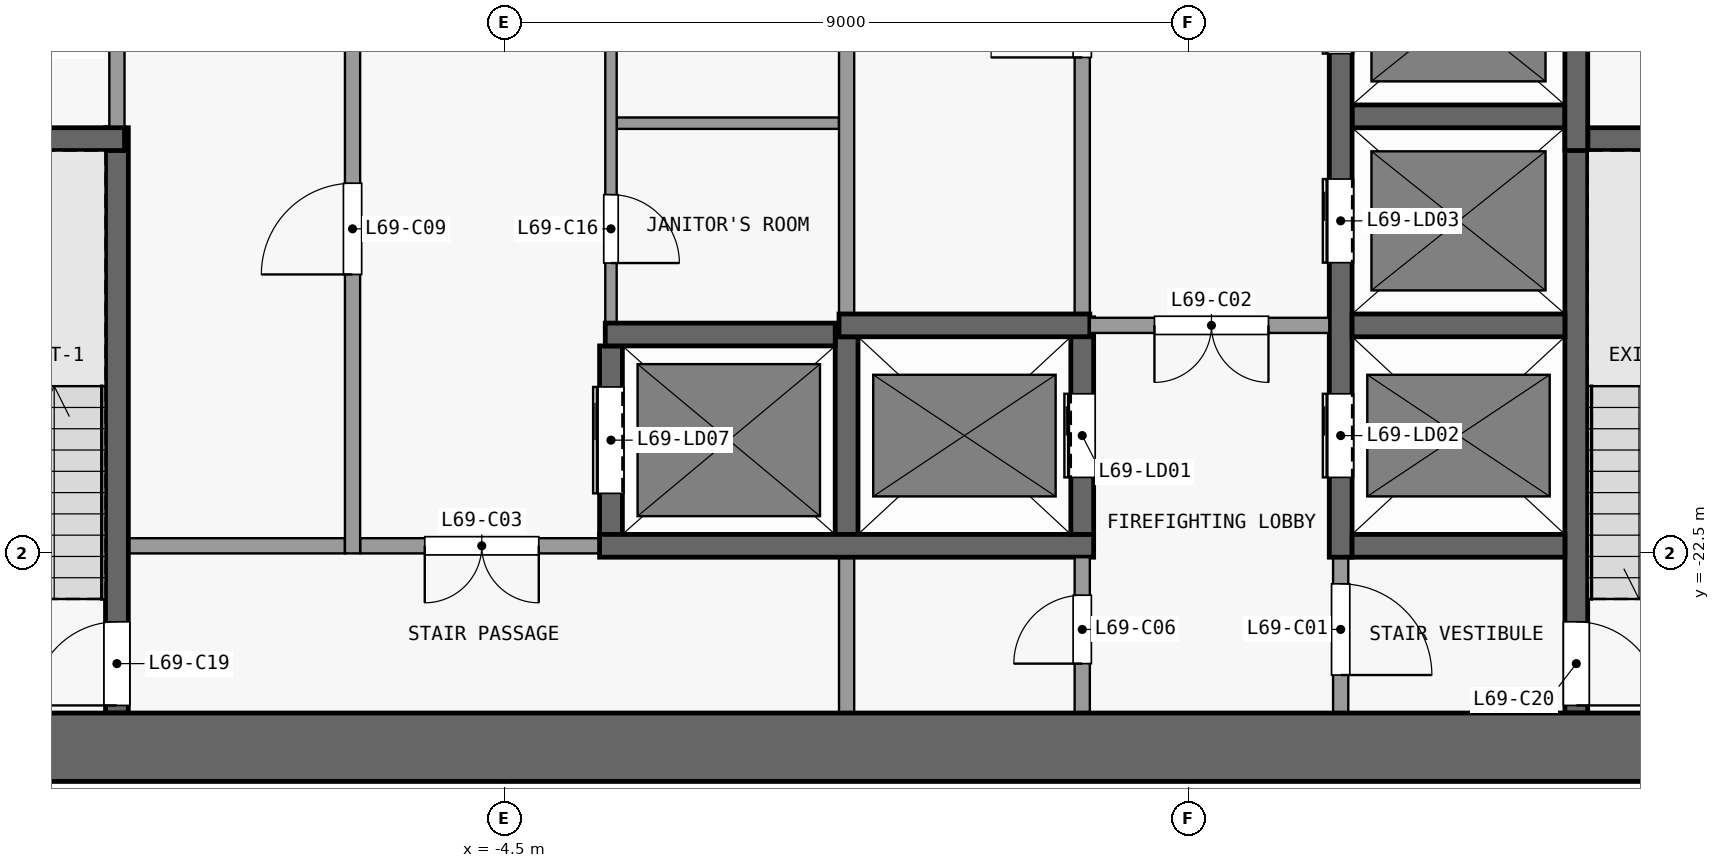
"""IFC4 building model, lengths in metres.
Left out: names, types, materials, properties, quantities, classifications, styles, units other than length and angle.
Written with IfcOpenShell. Run it as: python <this file> out.ifc"""

import sys

from ifc_helpers import new_model, si_unit, direction, frame, frame_2d, origin, place, context, subcontext, project, spatial, rectangle, extrude, element, fill, save


model = new_model("IFC4")
c1 = context("Model", 3, precision=1e-05, world=origin(), true_north=direction((0.0, 1.0)))
c2 = subcontext(c1, "Body", "Model", "MODEL_VIEW")
j1 = project(units=[si_unit("LENGTHUNIT", "METRE"), si_unit("PLANEANGLEUNIT", "RADIAN")], contexts=[c1])
p1 = place(None, origin())
s1 = spatial("IfcSite", under=j1, at=p1, CompositionType="ELEMENT")
p2 = place(p1, origin())
s2 = spatial("IfcBuilding", under=s1, at=p2, CompositionType="ELEMENT")
p3 = place(p2, frame((0.0, 0.0, 273.5)))
s3 = spatial("IfcBuildingStorey", under=s2, at=p3, CompositionType="ELEMENT", Elevation=273.5)
p4 = place(p3, frame((-13.1, -25.05, 0.0), z_axis=(0.0, 0.0, 1.0), x_axis=(1.0, 0.0, 0.0)))
e1 = element("IfcWall", 1, at=p4, inside=s3, PredefinedType="SHEAR", context=c2, shape_type="SweptSolid", body=[
    extrude(rectangle(XDim=26.2, YDim=0.9, at=frame_2d((13.1, 0.0))), origin(), (0.0, 0.0, 1.0), 3.3),
])
p5 = place(p3, frame((-9.45, -22.4, 0.0), z_axis=(0.0, 0.0, 1.0), x_axis=(1.0, 0.0, 0.0)))
e2 = element("IfcWall", 2, at=p5, inside=s3, PredefinedType="PARTITIONING", context=c2, shape_type="SweptSolid", body=[
    extrude(rectangle(XDim=2.85, YDim=0.2, at=frame_2d((1.425, 0.0))), origin(), (0.0, 0.0, 1.0), 3.3),
])
p6 = place(p3, frame((-3.25, -22.4, 0.0), z_axis=(0.0, 0.0, 1.0), x_axis=(-1.0, 0.0, 0.0)))
e3 = element("IfcWall", 3, at=p6, inside=s3, PredefinedType="PARTITIONING", context=c2, shape_type="SweptSolid", body=[
    extrude(rectangle(XDim=3.15, YDim=0.2, at=frame_2d((1.575, 0.0))), origin(), (0.0, 0.0, 1.0), 3.3),
])
p7 = place(p6, frame((0.8, 0.0, 0.0)))
e4 = element("IfcOpeningElement", 4, at=p7, cuts=e3, PredefinedType="OPENING", context=c2, shape_type="SweptSolid", body=[
    extrude(rectangle(XDim=1.5, YDim=2.1, at=frame_2d((0.75, 1.05))), frame((0.0, 0.11, 0.0), z_axis=(0.0, -1.0, 0.0), x_axis=(1.0, 0.0, 0.0)), (0.0, 0.0, 1.0), 0.22),
])
p8 = place(p3, frame((-3.25, -22.4, 0.0), z_axis=(0.0, 0.0, 1.0), x_axis=(1.0, 0.0, 0.0)))
e5 = element("IfcWall", 5, at=p8, inside=s3, PredefinedType="SHEAR", context=c2, shape_type="SweptSolid", body=[
    extrude(rectangle(XDim=6.5, YDim=0.3, at=frame_2d((3.25, 0.0))), origin(), (0.0, 0.0, 1.0), 3.3),
])
p9 = place(p3, frame((6.65, -22.4, 0.0), z_axis=(0.0, 0.0, 1.0), x_axis=(1.0, 0.0, 0.0)))
e6 = element("IfcWall", 6, at=p9, inside=s3, PredefinedType="SHEAR", context=c2, shape_type="SweptSolid", body=[
    extrude(rectangle(XDim=2.8, YDim=0.3, at=frame_2d((1.4, 0.0))), origin(), (0.0, 0.0, 1.0), 3.3),
])
p10 = place(p3, frame((-3.175, -19.62, 0.0), z_axis=(0.0, 0.0, 1.0), x_axis=(1.0, 0.0, 0.0)))
e7 = element("IfcWall", 7, at=p10, inside=s3, PredefinedType="SHEAR", context=c2, shape_type="SweptSolid", body=[
    extrude(rectangle(XDim=3.025, YDim=0.3, at=frame_2d((1.513, 0.0))), origin(), (0.0, 0.0, 1.0), 3.3),
])
p11 = place(p3, frame((-0.1, -19.5, 0.0), z_axis=(0.0, 0.0, 1.0), x_axis=(1.0, 0.0, 0.0)))
e8 = element("IfcWall", 8, at=p11, inside=s3, PredefinedType="SHEAR", context=c2, shape_type="SweptSolid", body=[
    extrude(rectangle(XDim=3.3, YDim=0.3, at=frame_2d((1.65, 0.0))), origin(), (0.0, 0.0, 1.0), 3.3),
])
p12 = place(p3, frame((6.35, -19.5, 0.0), z_axis=(0.0, 0.0, 1.0), x_axis=(-1.0, 0.0, 0.0)))
e9 = element("IfcWall", 9, at=p12, inside=s3, PredefinedType="PARTITIONING", context=c2, shape_type="SweptSolid", body=[
    extrude(rectangle(XDim=3.15, YDim=0.2, at=frame_2d((1.575, 0.0))), origin(), (0.0, 0.0, 1.0), 3.3),
])
p13 = place(p12, frame((0.8, 0.0, 0.0)))
e10 = element("IfcOpeningElement", 10, at=p13, cuts=e9, PredefinedType="OPENING", context=c2, shape_type="SweptSolid", body=[
    extrude(rectangle(XDim=1.5, YDim=2.1, at=frame_2d((0.75, 1.05))), frame((0.0, 0.11, 0.0), z_axis=(0.0, -1.0, 0.0), x_axis=(1.0, 0.0, 0.0)), (0.0, 0.0, 1.0), 0.22),
])
p14 = place(p3, frame((6.65, -19.5, 0.0), z_axis=(0.0, 0.0, 1.0), x_axis=(1.0, 0.0, 0.0)))
e11 = element("IfcWall", 11, at=p14, inside=s3, PredefinedType="SHEAR", context=c2, shape_type="SweptSolid", body=[
    extrude(rectangle(XDim=2.8, YDim=0.3, at=frame_2d((1.4, 0.0))), origin(), (0.0, 0.0, 1.0), 3.3),
])
p15 = place(p3, frame((-12.6, -17.05, 0.0), z_axis=(0.0, 0.0, 1.0), x_axis=(1.0, 0.0, 0.0)))
e12 = element("IfcWall", 12, at=p15, inside=s3, PredefinedType="SHEAR", context=c2, shape_type="SweptSolid", body=[
    extrude(rectangle(XDim=3.1, YDim=0.3, at=frame_2d((1.55, 0.0))), origin(), (0.0, 0.0, 1.0), 3.3),
])
p16 = place(p3, frame((9.75, -17.05, 0.0), z_axis=(0.0, 0.0, 1.0), x_axis=(1.0, 0.0, 0.0)))
e13 = element("IfcWall", 13, at=p16, inside=s3, PredefinedType="SHEAR", context=c2, shape_type="SweptSolid", body=[
    extrude(rectangle(XDim=2.85, YDim=0.3, at=frame_2d((1.425, 0.0))), origin(), (0.0, 0.0, 1.0), 3.3),
])
p17 = place(p3, frame((-3.025, -16.84, 0.0), z_axis=(0.0, 0.0, 1.0), x_axis=(1.0, 0.0, 0.0)))
e14 = element("IfcWall", 14, at=p17, inside=s3, PredefinedType="PARTITIONING", context=c2, shape_type="SweptSolid", body=[
    extrude(rectangle(XDim=2.925, YDim=0.15, at=frame_2d((1.462, 0.0))), origin(), (0.0, 0.0, 1.0), 3.3),
])
p18 = place(p3, frame((6.65, -16.75, 0.0), z_axis=(0.0, 0.0, 1.0), x_axis=(1.0, 0.0, 0.0)))
e15 = element("IfcWall", 15, at=p18, inside=s3, PredefinedType="SHEAR", context=c2, shape_type="SweptSolid", body=[
    extrude(rectangle(XDim=2.8, YDim=0.3, at=frame_2d((1.4, 0.0))), origin(), (0.0, 0.0, 1.0), 3.3),
])
p19 = place(p3, frame((-9.6, -24.6, 0.0), z_axis=(0.0, 0.0, 1.0), x_axis=(0.0, 1.0, 0.0)))
e16 = element("IfcWall", 16, at=p19, inside=s3, PredefinedType="SHEAR", context=c2, shape_type="SweptSolid", body=[
    extrude(rectangle(XDim=7.7, YDim=0.3, at=frame_2d((3.85, 0.0))), origin(), (0.0, 0.0, 1.0), 3.3),
])
p20 = place(p19, frame((0.1, 0.0, 0.0)))
e17 = element("IfcOpeningElement", 17, at=p20, cuts=e16, PredefinedType="OPENING", context=c2, shape_type="SweptSolid", body=[
    extrude(rectangle(XDim=1.1, YDim=2.1, at=frame_2d((0.55, 1.05))), frame((0.0, 0.16, 0.0), z_axis=(0.0, -1.0, 0.0), x_axis=(1.0, 0.0, 0.0)), (0.0, 0.0, 1.0), 0.32),
])
p21 = place(p3, frame((-9.6, -16.9, 0.0), z_axis=(0.0, 0.0, 1.0), x_axis=(0.0, 1.0, 0.0)))
e18 = element("IfcWall", 18, at=p21, inside=s3, PredefinedType="PARTITIONING", context=c2, shape_type="SweptSolid", body=[
    extrude(rectangle(XDim=2.74, YDim=0.2, at=frame_2d((1.37, 0.0))), origin(), (0.0, 0.0, 1.0), 3.3),
])
p22 = place(p3, frame((-6.5, -22.5, 0.0), z_axis=(0.0, 0.0, 1.0), x_axis=(0.0, 1.0, 0.0)))
e19 = element("IfcWall", 19, at=p22, inside=s3, PredefinedType="PARTITIONING", context=c2, shape_type="SweptSolid", body=[
    extrude(rectangle(XDim=8.54, YDim=0.2, at=frame_2d((4.27, 0.0))), origin(), (0.0, 0.0, 1.0), 3.3),
])
p23 = place(p22, frame((3.67, 0.0, 0.0)))
e20 = element("IfcOpeningElement", 20, at=p23, cuts=e19, PredefinedType="OPENING", context=c2, shape_type="SweptSolid", body=[
    extrude(rectangle(XDim=1.2, YDim=2.1, at=frame_2d((0.6, 1.05))), frame((0.0, 0.11, 0.0), z_axis=(0.0, -1.0, 0.0), x_axis=(1.0, 0.0, 0.0)), (0.0, 0.0, 1.0), 0.22),
])
p24 = place(p3, frame((-3.1, -22.25, 0.0), z_axis=(0.0, 0.0, 1.0), x_axis=(0.0, 1.0, 0.0)))
e21 = element("IfcWall", 21, at=p24, inside=s3, PredefinedType="SHEAR", context=c2, shape_type="SweptSolid", body=[
    extrude(rectangle(XDim=2.48, YDim=0.3, at=frame_2d((1.24, 0.0))), origin(), (0.0, 0.0, 1.0), 3.3),
])
p25 = place(p24, frame((0.54, 0.0, 0.0)))
e22 = element("IfcOpeningElement", 22, at=p25, cuts=e21, PredefinedType="OPENING", context=c2, shape_type="SweptSolid", body=[
    extrude(rectangle(XDim=1.4, YDim=2.1, at=frame_2d((0.7, 1.05))), frame((0.0, 0.16, 0.0), z_axis=(0.0, -1.0, 0.0), x_axis=(1.0, 0.0, 0.0)), (0.0, 0.0, 1.0), 0.32),
])
p26 = place(p3, frame((-3.1, -8.5, 0.0), z_axis=(0.0, 0.0, 1.0), x_axis=(0.0, -1.0, 0.0)))
e23 = element("IfcWall", 23, at=p26, inside=s3, PredefinedType="PARTITIONING", context=c2, shape_type="SweptSolid", body=[
    extrude(rectangle(XDim=10.97, YDim=0.15, at=frame_2d((5.485, 0.0))), origin(), (0.0, 0.0, 1.0), 3.3),
])
p27 = place(p26, frame((9.28, 0.0, 0.0)))
e24 = element("IfcOpeningElement", 24, at=p27, cuts=e23, PredefinedType="OPENING", context=c2, shape_type="SweptSolid", body=[
    extrude(rectangle(XDim=0.9, YDim=2.1, at=frame_2d((0.45, 1.05))), frame((0.0, 0.085, 0.0), z_axis=(0.0, -1.0, 0.0), x_axis=(1.0, 0.0, 0.0)), (0.0, 0.0, 1.0), 0.17),
])
p28 = place(p26, frame((3.57, 0.0, 0.0)))
e25 = element("IfcOpeningElement", 25, at=p28, cuts=e23, PredefinedType="OPENING", context=c2, shape_type="SweptSolid", body=[
    extrude(rectangle(XDim=1.2, YDim=2.1, at=frame_2d((0.6, 1.05))), frame((0.0, 0.085, 0.0), z_axis=(0.0, -1.0, 0.0), x_axis=(1.0, 0.0, 0.0)), (0.0, 0.0, 1.0), 0.17),
])
p29 = place(p3, frame((0.0, -24.6, 0.0), z_axis=(0.0, 0.0, 1.0), x_axis=(0.0, 1.0, 0.0)))
e26 = element("IfcWall", 26, at=p29, inside=s3, PredefinedType="PARTITIONING", context=c2, shape_type="SweptSolid", body=[
    extrude(rectangle(XDim=2.05, YDim=0.2, at=frame_2d((1.025, 0.0))), origin(), (0.0, 0.0, 1.0), 3.3),
])
p30 = place(p3, frame((0.0, -22.25, 0.0), z_axis=(0.0, 0.0, 1.0), x_axis=(0.0, 1.0, 0.0)))
e27 = element("IfcWall", 27, at=p30, inside=s3, PredefinedType="SHEAR", context=c2, shape_type="SweptSolid", body=[
    extrude(rectangle(XDim=2.6, YDim=0.3, at=frame_2d((1.3, 0.0))), origin(), (0.0, 0.0, 1.0), 3.3),
])
p31 = place(p3, frame((0.0, -19.35, 0.0), z_axis=(0.0, 0.0, 1.0), x_axis=(0.0, 1.0, 0.0)))
e28 = element("IfcWall", 28, at=p31, inside=s3, PredefinedType="PARTITIONING", context=c2, shape_type="SweptSolid", body=[
    extrude(rectangle(XDim=8.2, YDim=0.2, at=frame_2d((4.1, 0.0))), origin(), (0.0, 0.0, 1.0), 3.3),
])
p32 = place(p3, frame((3.1, -24.6, 0.0), z_axis=(0.0, 0.0, 1.0), x_axis=(0.0, 1.0, 0.0)))
e29 = element("IfcWall", 29, at=p32, inside=s3, PredefinedType="PARTITIONING", context=c2, shape_type="SweptSolid", body=[
    extrude(rectangle(XDim=2.05, YDim=0.2, at=frame_2d((1.025, 0.0))), origin(), (0.0, 0.0, 1.0), 3.3),
])
p33 = place(p32, frame((0.65, 0.0, 0.0)))
e30 = element("IfcOpeningElement", 30, at=p33, cuts=e29, PredefinedType="OPENING", context=c2, shape_type="SweptSolid", body=[
    extrude(rectangle(XDim=0.9, YDim=2.1, at=frame_2d((0.45, 1.05))), frame((0.0, 0.11, 0.0), z_axis=(0.0, -1.0, 0.0), x_axis=(1.0, 0.0, 0.0)), (0.0, 0.0, 1.0), 0.22),
])
p34 = place(p3, frame((3.1, -22.25, 0.0), z_axis=(0.0, 0.0, 1.0), x_axis=(0.0, 1.0, 0.0)))
e31 = element("IfcWall", 31, at=p34, inside=s3, PredefinedType="SHEAR", context=c2, shape_type="SweptSolid", body=[
    extrude(rectangle(XDim=2.85, YDim=0.3, at=frame_2d((1.425, 0.0))), origin(), (0.0, 0.0, 1.0), 3.3),
])
p35 = place(p34, frame((0.75, 0.0, 0.0)))
e32 = element("IfcOpeningElement", 32, at=p35, cuts=e31, PredefinedType="OPENING", context=c2, shape_type="SweptSolid", body=[
    extrude(rectangle(XDim=1.1, YDim=2.1, at=frame_2d((0.55, 1.05))), frame((0.0, 0.16, 0.0), z_axis=(0.0, -1.0, 0.0), x_axis=(1.0, 0.0, 0.0)), (0.0, 0.0, 1.0), 0.32),
])
p36 = place(p3, frame((3.1, -19.6, 0.0), z_axis=(0.0, 0.0, 1.0), x_axis=(0.0, 1.0, 0.0)))
e33 = element("IfcWall", 33, at=p36, inside=s3, PredefinedType="PARTITIONING", context=c2, shape_type="SweptSolid", body=[
    extrude(rectangle(XDim=8.45, YDim=0.2, at=frame_2d((4.225, 0.0))), origin(), (0.0, 0.0, 1.0), 3.3),
])
p37 = place(p36, frame((3.625, 0.0, 0.0)))
e34 = element("IfcOpeningElement", 34, at=p37, cuts=e33, PredefinedType="OPENING", context=c2, shape_type="SweptSolid", body=[
    extrude(rectangle(XDim=1.2, YDim=2.1, at=frame_2d((0.6, 1.05))), frame((0.0, 0.11, 0.0), z_axis=(0.0, -1.0, 0.0), x_axis=(1.0, 0.0, 0.0)), (0.0, 0.0, 1.0), 0.22),
])
p38 = place(p3, frame((6.5, -22.55, 0.0), z_axis=(0.0, 0.0, 1.0), x_axis=(0.0, -1.0, 0.0)))
e35 = element("IfcWall", 35, at=p38, inside=s3, PredefinedType="PARTITIONING", context=c2, shape_type="SweptSolid", body=[
    extrude(rectangle(XDim=2.05, YDim=0.2, at=frame_2d((1.025, 0.0))), origin(), (0.0, 0.0, 1.0), 3.3),
])
p39 = place(p38, frame((0.35, 0.0, 0.0)))
e36 = element("IfcOpeningElement", 36, at=p39, cuts=e35, PredefinedType="OPENING", context=c2, shape_type="SweptSolid", body=[
    extrude(rectangle(XDim=1.2, YDim=2.1, at=frame_2d((0.6, 1.05))), frame((0.0, 0.11, 0.0), z_axis=(0.0, -1.0, 0.0), x_axis=(1.0, 0.0, 0.0)), (0.0, 0.0, 1.0), 0.22),
])
p40 = place(p3, frame((6.5, -22.55, 0.0), z_axis=(0.0, 0.0, 1.0), x_axis=(0.0, 1.0, 0.0)))
e37 = element("IfcWall", 37, at=p40, inside=s3, PredefinedType="SHEAR", context=c2, shape_type="SweptSolid", body=[
    extrude(rectangle(XDim=14.05, YDim=0.3, at=frame_2d((7.025, 0.0))), origin(), (0.0, 0.0, 1.0), 3.3),
])
p41 = place(p40, frame((1.05, 0.0, 0.0)))
e38 = element("IfcOpeningElement", 38, at=p41, cuts=e37, PredefinedType="OPENING", context=c2, shape_type="SweptSolid", body=[
    extrude(rectangle(XDim=1.1, YDim=2.1, at=frame_2d((0.55, 1.05))), frame((0.0, 0.16, 0.0), z_axis=(0.0, -1.0, 0.0), x_axis=(1.0, 0.0, 0.0)), (0.0, 0.0, 1.0), 0.32),
])
p42 = place(p40, frame((3.875, 0.0, 0.0)))
e39 = element("IfcOpeningElement", 39, at=p42, cuts=e37, PredefinedType="OPENING", context=c2, shape_type="SweptSolid", body=[
    extrude(rectangle(XDim=1.1, YDim=2.1, at=frame_2d((0.55, 1.05))), frame((0.0, 0.16, 0.0), z_axis=(0.0, -1.0, 0.0), x_axis=(1.0, 0.0, 0.0)), (0.0, 0.0, 1.0), 0.32),
])
p43 = place(p40, frame((6.625, 0.0, 0.0)))
e40 = element("IfcOpeningElement", 40, at=p43, cuts=e37, PredefinedType="OPENING", context=c2, shape_type="SweptSolid", body=[
    extrude(rectangle(XDim=1.1, YDim=2.1, at=frame_2d((0.55, 1.05))), frame((0.0, 0.16, 0.0), z_axis=(0.0, -1.0, 0.0), x_axis=(1.0, 0.0, 0.0)), (0.0, 0.0, 1.0), 0.32),
])
p44 = place(p40, frame((9.375, 0.0, 0.0)))
e41 = element("IfcOpeningElement", 41, at=p44, cuts=e37, PredefinedType="OPENING", context=c2, shape_type="SweptSolid", body=[
    extrude(rectangle(XDim=1.1, YDim=2.1, at=frame_2d((0.55, 1.05))), frame((0.0, 0.16, 0.0), z_axis=(0.0, -1.0, 0.0), x_axis=(1.0, 0.0, 0.0)), (0.0, 0.0, 1.0), 0.32),
])
p45 = place(p40, frame((12.125, 0.0, 0.0)))
e42 = element("IfcOpeningElement", 42, at=p45, cuts=e37, PredefinedType="OPENING", context=c2, shape_type="SweptSolid", body=[
    extrude(rectangle(XDim=1.1, YDim=2.1, at=frame_2d((0.55, 1.05))), frame((0.0, 0.16, 0.0), z_axis=(0.0, -1.0, 0.0), x_axis=(1.0, 0.0, 0.0)), (0.0, 0.0, 1.0), 0.32),
])
p46 = place(p3, frame((9.6, -16.9, 0.0), z_axis=(0.0, 0.0, 1.0), x_axis=(0.0, -1.0, 0.0)))
e43 = element("IfcWall", 43, at=p46, inside=s3, PredefinedType="SHEAR", context=c2, shape_type="SweptSolid", body=[
    extrude(rectangle(XDim=7.7, YDim=0.3, at=frame_2d((3.85, 0.0))), origin(), (0.0, 0.0, 1.0), 3.3),
])
p47 = place(p46, frame((6.5, 0.0, 0.0)))
e44 = element("IfcOpeningElement", 44, at=p47, cuts=e43, PredefinedType="OPENING", context=c2, shape_type="SweptSolid", body=[
    extrude(rectangle(XDim=1.1, YDim=2.1, at=frame_2d((0.55, 1.05))), frame((0.0, 0.16, 0.0), z_axis=(0.0, -1.0, 0.0), x_axis=(1.0, 0.0, 0.0)), (0.0, 0.0, 1.0), 0.32),
])
p48 = place(p3, frame((9.6, -17.2, 0.0), z_axis=(0.0, 0.0, 1.0), x_axis=(0.0, 1.0, 0.0)))
e45 = element("IfcWall", 45, at=p48, inside=s3, PredefinedType="SHEAR", context=c2, shape_type="SweptSolid", body=[
    extrude(rectangle(XDim=8.7, YDim=0.3, at=frame_2d((4.35, 0.0))), origin(), (0.0, 0.0, 1.0), 3.3),
])
p49 = place(p35, origin())
e46 = element("IfcDoor", 46, at=p49, inside=s3, OperationType="DOUBLE_DOOR_SLIDING", PredefinedType="DOOR", context=c2, shape_type="SweptSolid", body=[
    extrude(rectangle(XDim=1.1, YDim=2.1, at=frame_2d((0.55, 1.05))), frame((0.0, 0.025, 0.0), z_axis=(0.0, -1.0, 0.0), x_axis=(1.0, 0.0, 0.0)), (0.0, 0.0, 1.0), 0.05),
])
fill(e32, e46)
p50 = place(p41, origin())
e47 = element("IfcDoor", 47, at=p50, inside=s3, OperationType="DOUBLE_DOOR_SLIDING", PredefinedType="DOOR", context=c2, shape_type="SweptSolid", body=[
    extrude(rectangle(XDim=1.1, YDim=2.1, at=frame_2d((0.55, 1.05))), frame((0.0, 0.025, 0.0), z_axis=(0.0, -1.0, 0.0), x_axis=(1.0, 0.0, 0.0)), (0.0, 0.0, 1.0), 0.05),
])
fill(e38, e47)
p51 = place(p42, origin())
e48 = element("IfcDoor", 48, at=p51, inside=s3, OperationType="DOUBLE_DOOR_SLIDING", PredefinedType="DOOR", context=c2, shape_type="SweptSolid", body=[
    extrude(rectangle(XDim=1.1, YDim=2.1, at=frame_2d((0.55, 1.05))), frame((0.0, 0.025, 0.0), z_axis=(0.0, -1.0, 0.0), x_axis=(1.0, 0.0, 0.0)), (0.0, 0.0, 1.0), 0.05),
])
fill(e39, e48)
p52 = place(p43, origin())
e49 = element("IfcDoor", 49, at=p52, inside=s3, OperationType="DOUBLE_DOOR_SLIDING", PredefinedType="DOOR", context=c2, shape_type="SweptSolid", body=[
    extrude(rectangle(XDim=1.1, YDim=2.1, at=frame_2d((0.55, 1.05))), frame((0.0, 0.025, 0.0), z_axis=(0.0, -1.0, 0.0), x_axis=(1.0, 0.0, 0.0)), (0.0, 0.0, 1.0), 0.05),
])
fill(e40, e49)
p53 = place(p25, origin())
e50 = element("IfcDoor", 50, at=p53, inside=s3, OperationType="DOUBLE_DOOR_SLIDING", PredefinedType="DOOR", context=c2, shape_type="SweptSolid", body=[
    extrude(rectangle(XDim=1.4, YDim=2.1, at=frame_2d((0.7, 1.05))), frame((0.0, 0.025, 0.0), z_axis=(0.0, -1.0, 0.0), x_axis=(1.0, 0.0, 0.0)), (0.0, 0.0, 1.0), 0.05),
])
fill(e22, e50)
p54 = place(p39, origin())
e51 = element("IfcDoor", 51, at=p54, inside=s3, OperationType="SINGLE_SWING_RIGHT", PredefinedType="DOOR", context=c2, shape_type="SweptSolid", body=[
    extrude(rectangle(XDim=1.2, YDim=2.1, at=frame_2d((0.6, 1.05))), frame((0.0, 0.025, 0.0), z_axis=(0.0, -1.0, 0.0), x_axis=(1.0, 0.0, 0.0)), (0.0, 0.0, 1.0), 0.05),
])
fill(e36, e51)
p55 = place(p13, origin())
e52 = element("IfcDoor", 52, at=p55, inside=s3, OperationType="DOUBLE_DOOR_SINGLE_SWING", PredefinedType="DOOR", context=c2, shape_type="SweptSolid", body=[
    extrude(rectangle(XDim=1.5, YDim=2.1, at=frame_2d((0.75, 1.05))), frame((0.0, 0.025, 0.0), z_axis=(0.0, -1.0, 0.0), x_axis=(1.0, 0.0, 0.0)), (0.0, 0.0, 1.0), 0.05),
])
fill(e10, e52)
p56 = place(p7, origin())
e53 = element("IfcDoor", 53, at=p56, inside=s3, OperationType="DOUBLE_DOOR_SINGLE_SWING", PredefinedType="DOOR", context=c2, shape_type="SweptSolid", body=[
    extrude(rectangle(XDim=1.5, YDim=2.1, at=frame_2d((0.75, 1.05))), frame((0.0, 0.025, 0.0), z_axis=(0.0, -1.0, 0.0), x_axis=(1.0, 0.0, 0.0)), (0.0, 0.0, 1.0), 0.05),
])
fill(e4, e53)
p57 = place(p33, origin())
e54 = element("IfcDoor", 54, at=p57, inside=s3, OperationType="SINGLE_SWING_LEFT", PredefinedType="DOOR", context=c2, shape_type="SweptSolid", body=[
    extrude(rectangle(XDim=0.9, YDim=2.1, at=frame_2d((0.45, 1.05))), frame((0.0, 0.025, 0.0), z_axis=(0.0, -1.0, 0.0), x_axis=(1.0, 0.0, 0.0)), (0.0, 0.0, 1.0), 0.05),
])
fill(e30, e54)
p58 = place(p23, origin())
e55 = element("IfcDoor", 55, at=p58, inside=s3, OperationType="SINGLE_SWING_LEFT", PredefinedType="DOOR", context=c2, shape_type="SweptSolid", body=[
    extrude(rectangle(XDim=1.2, YDim=2.1, at=frame_2d((0.6, 1.05))), frame((0.0, 0.025, 0.0), z_axis=(0.0, -1.0, 0.0), x_axis=(1.0, 0.0, 0.0)), (0.0, 0.0, 1.0), 0.05),
])
fill(e20, e55)
p59 = place(p37, origin())
e56 = element("IfcDoor", 56, at=p59, inside=s3, OperationType="SINGLE_SWING_LEFT", PredefinedType="DOOR", context=c2, shape_type="SweptSolid", body=[
    extrude(rectangle(XDim=1.2, YDim=2.1, at=frame_2d((0.6, 1.05))), frame((0.0, 0.025, 0.0), z_axis=(0.0, -1.0, 0.0), x_axis=(1.0, 0.0, 0.0)), (0.0, 0.0, 1.0), 0.05),
])
fill(e34, e56)
p60 = place(p27, origin())
e57 = element("IfcDoor", 57, at=p60, inside=s3, OperationType="SINGLE_SWING_RIGHT", PredefinedType="DOOR", context=c2, shape_type="SweptSolid", body=[
    extrude(rectangle(XDim=0.9, YDim=2.1, at=frame_2d((0.45, 1.05))), frame((0.0, 0.025, 0.0), z_axis=(0.0, -1.0, 0.0), x_axis=(1.0, 0.0, 0.0)), (0.0, 0.0, 1.0), 0.05),
])
fill(e24, e57)
p61 = place(p20, origin())
e58 = element("IfcDoor", 58, at=p61, inside=s3, OperationType="SINGLE_SWING_LEFT", PredefinedType="DOOR", context=c2, shape_type="SweptSolid", body=[
    extrude(rectangle(XDim=1.1, YDim=2.1, at=frame_2d((0.55, 1.05))), frame((0.0, 0.025, 0.0), z_axis=(0.0, -1.0, 0.0), x_axis=(1.0, 0.0, 0.0)), (0.0, 0.0, 1.0), 0.05),
])
fill(e17, e58)
p62 = place(p47, origin())
e59 = element("IfcDoor", 59, at=p62, inside=s3, OperationType="SINGLE_SWING_RIGHT", PredefinedType="DOOR", context=c2, shape_type="SweptSolid", body=[
    extrude(rectangle(XDim=1.1, YDim=2.1, at=frame_2d((0.55, 1.05))), frame((0.0, 0.025, 0.0), z_axis=(0.0, -1.0, 0.0), x_axis=(1.0, 0.0, 0.0)), (0.0, 0.0, 1.0), 0.05),
])
fill(e44, e59)
save(model, sys.argv[1])
